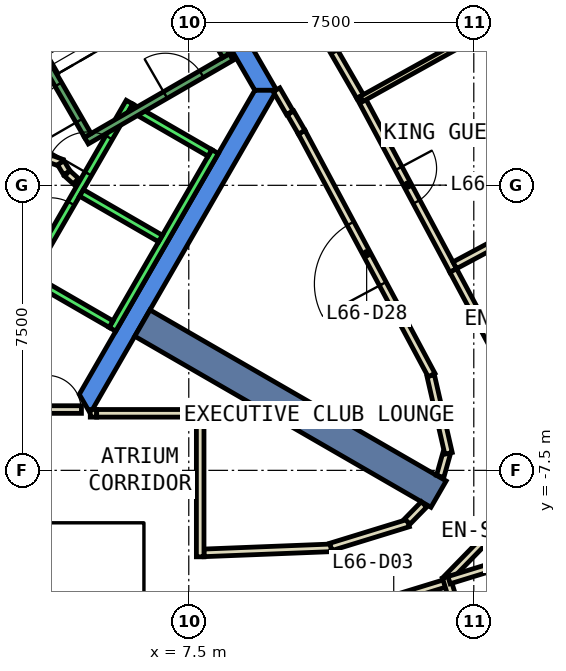
"""IFC4 building model, lengths in metres.
Left out: names, types, materials, properties, quantities, classifications, styles, units other than length and angle.
Written with IfcOpenShell. Run it as: python <this file> out.ifc"""

import sys

from ifc_helpers import new_model, si_unit, direction, frame, frame_2d, origin, place, context, subcontext, project, spatial, polyline, rectangle, outline, extrude, element, fill, save


model = new_model("IFC4")
c1 = context("Model", 3, precision=1e-05, world=origin(), true_north=direction((0.0, 1.0)))
c2 = subcontext(c1, "Body", "Model", "MODEL_VIEW")
j1 = project(units=[si_unit("LENGTHUNIT", "METRE"), si_unit("PLANEANGLEUNIT", "RADIAN")], contexts=[c1])
p1 = place(None, origin())
s1 = spatial("IfcSite", under=j1, at=p1, CompositionType="ELEMENT")
p2 = place(p1, origin())
s2 = spatial("IfcBuilding", under=s1, at=p2, CompositionType="ELEMENT")
p3 = place(p2, frame((0.0, 0.0, 286.4)))
s3 = spatial("IfcBuildingStorey", under=s2, at=p3, CompositionType="ELEMENT", Elevation=286.4)
p4 = place(p3, frame((0.0, 0.0, -0.6)))
e1 = element("IfcWall", 1, at=p4, inside=s3, PredefinedType="SHEAR", context=c2, shape_type="SweptSolid", body=[
    extrude(outline(polyline([(5.486, 9.998), (5.053, 9.748), (9.238, 2.5), (9.815, 2.5), (5.486, 9.998)])), origin(), (0.0, 0.0, 1.0), 3.86),
])
p5 = place(p3, frame((0.0, 0.0, -0.6)))
e2 = element("IfcWall", 2, at=p5, inside=s3, PredefinedType="SHEAR", context=c2, shape_type="SweptSolid", body=[
    extrude(outline(polyline([(4.907, -6.0), (9.815, 2.5), (9.238, 2.5), (4.619, -5.5), (4.907, -6.0)])), origin(), (0.0, 0.0, 1.0), 3.86),
])
p6 = place(p3, frame((6.279, -3.625, -0.6), z_axis=(0.0, 0.0, 1.0), x_axis=(0.866017533419, -0.500013631625, 0.0)))
e3 = element("IfcWall", 3, at=p6, inside=s3, PredefinedType="SHEAR", context=c2, shape_type="SweptSolid", body=[
    extrude(rectangle(XDim=9.0, YDim=0.8, at=frame_2d((4.5, 0.0))), origin(), (0.0, 0.0, 1.0), 3.86),
])
p7 = place(p3, frame((7.9, -9.671, 0.0), z_axis=(0.0, 0.0, 1.0), x_axis=(0.999223751627, 0.039394088186, 0.0)))
e4 = element("IfcWall", 4, at=p7, inside=s3, PredefinedType="PARTITIONING", context=c2, shape_type="SweptSolid", body=[
    extrude(rectangle(XDim=3.347, YDim=0.2, at=frame_2d((1.673, 0.0))), origin(), (0.0, 0.0, 1.0), 3.26),
])
p8 = place(p3, frame((11.239, -9.514, 0.0), z_axis=(0.0, 0.0, 1.0), x_axis=(0.955838469047, 0.293892533234, 0.0)))
e5 = element("IfcWall", 5, at=p8, inside=s3, PredefinedType="PARTITIONING", context=c2, shape_type="SweptSolid", body=[
    extrude(rectangle(XDim=2.13, YDim=0.2, at=frame_2d((1.065, 0.0))), origin(), (0.0, 0.0, 1.0), 3.26),
])
p9 = place(p3, frame((13.25, -8.846, 0.0), z_axis=(0.0, 0.0, 1.0), x_axis=(0.698333537371, 0.715772499181, 0.0)))
e6 = element("IfcWall", 6, at=p9, inside=s3, PredefinedType="PARTITIONING", context=c2, shape_type="SweptSolid", body=[
    extrude(rectangle(XDim=0.63, YDim=0.2, at=frame_2d((0.315, 0.0))), origin(), (0.0, 0.0, 1.0), 3.26),
])
p10 = place(p3, frame((14.115, -7.659, 0.0), z_axis=(0.0, 0.0, 1.0), x_axis=(0.270633612894, 0.96268242301, 0.0)))
e7 = element("IfcWall", 7, at=p10, inside=s3, PredefinedType="PARTITIONING", context=c2, shape_type="SweptSolid", body=[
    extrude(rectangle(XDim=0.632, YDim=0.2, at=frame_2d((0.316, 0.0))), origin(), (0.0, 0.0, 1.0), 3.26),
])
p11 = place(p3, frame((14.335, -7.052, 0.0), z_axis=(0.0, 0.0, 1.0), x_axis=(-0.22355315143, 0.974691740237, 0.0)))
e8 = element("IfcWall", 8, at=p11, inside=s3, PredefinedType="PARTITIONING", context=c2, shape_type="SweptSolid", body=[
    extrude(rectangle(XDim=2.102, YDim=0.2, at=frame_2d((1.051, 0.0))), origin(), (0.0, 0.0, 1.0), 3.26),
])
p12 = place(p3, frame((13.89, -4.994, 0.0), z_axis=(0.0, 0.0, 1.0), x_axis=(-0.471713767504, 0.881751734644, 0.0)))
e9 = element("IfcWall", 9, at=p12, inside=s3, PredefinedType="PARTITIONING", context=c2, shape_type="SweptSolid", body=[
    extrude(rectangle(XDim=7.248, YDim=0.2, at=frame_2d((3.624, 0.0))), origin(), (0.0, 0.0, 1.0), 3.26),
])
p13 = place(p12, frame((2.724, 0.0, 0.0)))
e10 = element("IfcOpeningElement", 10, at=p13, cuts=e9, PredefinedType="OPENING", context=c2, shape_type="SweptSolid", body=[
    extrude(rectangle(XDim=1.8, YDim=2.1, at=frame_2d((0.9, 1.05))), frame((0.0, 0.11, 0.0), z_axis=(0.0, -1.0, 0.0), x_axis=(1.0, 0.0, 0.0)), (0.0, 0.0, 1.0), 0.22),
])
p14 = place(p3, frame((10.471, 1.397, 0.0), z_axis=(0.0, 0.0, 1.0), x_axis=(-0.500069990121, 0.865984991198, 0.0)))
e11 = element("IfcWall", 11, at=p14, inside=s3, PredefinedType="PARTITIONING", context=c2, shape_type="SweptSolid", body=[
    extrude(rectangle(XDim=0.588, YDim=0.2, at=frame_2d((0.294, 0.0))), origin(), (0.0, 0.0, 1.0), 3.26),
])
p15 = place(p3, frame((10.157, 1.912, 0.0), z_axis=(0.0, 0.0, 1.0), x_axis=(-0.500482383858, 0.865746720148, 0.0)))
e12 = element("IfcWall", 12, at=p15, inside=s3, PredefinedType="PARTITIONING", context=c2, shape_type="SweptSolid", body=[
    extrude(rectangle(XDim=0.695, YDim=0.2, at=frame_2d((0.348, 0.0))), origin(), (0.0, 0.0, 1.0), 3.26),
])
p16 = place(p3, frame((14.243, -10.474, 0.0), z_axis=(0.0, 0.0, 1.0), x_axis=(-0.955937788993, -0.293569316475, 0.0)))
e13 = element("IfcWall", 13, at=p16, inside=s3, PredefinedType="PARTITIONING", context=c2, shape_type="SweptSolid", body=[
    extrude(rectangle(XDim=2.823, YDim=0.2, at=frame_2d((1.412, 0.0))), origin(), (0.0, 0.0, 1.0), 3.26),
])
p17 = place(p16, frame((0.912, 0.0, 0.0)))
e14 = element("IfcOpeningElement", 14, at=p17, cuts=e13, PredefinedType="OPENING", context=c2, shape_type="SweptSolid", body=[
    extrude(rectangle(XDim=1.0, YDim=2.1, at=frame_2d((0.5, 1.05))), frame((0.0, 0.11, 0.0), z_axis=(0.0, -1.0, 0.0), x_axis=(1.0, 0.0, 0.0)), (0.0, 0.0, 1.0), 0.22),
])
p18 = place(p3, frame((15.535, -9.081, 0.0), z_axis=(0.0, 0.0, 1.0), x_axis=(-0.698342132704, -0.715764113162, 0.0)))
e15 = element("IfcWall", 15, at=p18, inside=s3, PredefinedType="PARTITIONING", context=c2, shape_type="SweptSolid", body=[
    extrude(rectangle(XDim=1.836, YDim=0.2, at=frame_2d((0.918, 0.0))), origin(), (0.0, 0.0, 1.0), 3.26),
])
p19 = place(p3, frame((12.009, 2.338, 0.0), z_axis=(0.0, 0.0, 1.0), x_axis=(0.471771260231, -0.88172097515, 0.0)))
e16 = element("IfcWall", 16, at=p19, inside=s3, PredefinedType="PARTITIONING", context=c2, shape_type="SweptSolid", body=[
    extrude(rectangle(XDim=5.193, YDim=0.2, at=frame_2d((2.597, 0.0))), origin(), (0.0, 0.0, 1.0), 3.26),
])
p20 = place(p19, frame((2.146, 0.0, 0.0)))
e17 = element("IfcOpeningElement", 17, at=p20, cuts=e16, PredefinedType="OPENING", context=c2, shape_type="SweptSolid", body=[
    extrude(rectangle(XDim=1.0, YDim=2.1, at=frame_2d((0.5, 1.05))), frame((0.0, 0.11, 0.0), z_axis=(0.0, -1.0, 0.0), x_axis=(1.0, 0.0, 0.0)), (0.0, 0.0, 1.0), 0.22),
])
p21 = place(p3, frame((14.459, -2.241, 0.0), z_axis=(0.0, 0.0, 1.0), x_axis=(0.471648235011, -0.881786789656, 0.0)))
e18 = element("IfcWall", 18, at=p21, inside=s3, PredefinedType="PARTITIONING", context=c2, shape_type="SweptSolid", body=[
    extrude(rectangle(XDim=2.199, YDim=0.2, at=frame_2d((1.1, 0.0))), origin(), (0.0, 0.0, 1.0), 3.26),
])
p22 = place(p3, frame((10.17, 5.519, 0.0), z_axis=(0.0, 0.0, 1.0), x_axis=(0.499990860175, -0.866030680601, 0.0)))
e19 = element("IfcWall", 19, at=p22, inside=s3, PredefinedType="PARTITIONING", context=c2, shape_type="SweptSolid", body=[
    extrude(rectangle(XDim=3.674, YDim=0.2, at=frame_2d((1.837, 0.0))), origin(), (0.0, 0.0, 1.0), 3.26),
])
p23 = place(p22, frame((1.337, 0.0, 0.0)))
e20 = element("IfcOpeningElement", 20, at=p23, cuts=e19, PredefinedType="OPENING", context=c2, shape_type="SweptSolid", body=[
    extrude(rectangle(XDim=1.0, YDim=2.1, at=frame_2d((0.5, 1.05))), frame((0.0, 0.11, 0.0), z_axis=(0.0, -1.0, 0.0), x_axis=(1.0, 0.0, 0.0)), (0.0, 0.0, 1.0), 0.22),
])
p24 = place(p3, frame((3.838, 0.702, 0.0), z_axis=(0.0, 0.0, 1.0), x_axis=(0.941035081519, -0.338308993895, 0.0)))
e21 = element("IfcWall", 21, at=p24, inside=s3, PredefinedType="PARTITIONING", context=c2, shape_type="SweptSolid", body=[
    extrude(rectangle(XDim=0.337, YDim=0.2, at=frame_2d((0.168, 0.0))), origin(), (0.0, 0.0, 1.0), 3.26),
])
p25 = place(p3, frame((4.132, 0.593, 0.0), z_axis=(0.0, 0.0, 1.0), x_axis=(0.513561617048, -0.858052717201, 0.0)))
e22 = element("IfcWall", 22, at=p25, inside=s3, PredefinedType="PARTITIONING", context=c2, shape_type="SweptSolid", body=[
    extrude(rectangle(XDim=0.308, YDim=0.2, at=frame_2d((0.154, 0.0))), origin(), (0.0, 0.0, 1.0), 3.26),
])
p26 = place(p3, frame((4.301, 0.315, 0.0), z_axis=(0.0, 0.0, 1.0), x_axis=(0.741798017506, -0.670623367639, 0.0)))
e23 = element("IfcWall", 23, at=p26, inside=s3, PredefinedType="PARTITIONING", context=c2, shape_type="SweptSolid", body=[
    extrude(rectangle(XDim=0.309, YDim=0.2, at=frame_2d((0.154, 0.0))), origin(), (0.0, 0.0, 1.0), 3.26),
])
p27 = place(p3, frame((4.908, -5.999, 0.0), z_axis=(0.0, 0.0, 1.0), x_axis=(1.0, 0.0, 0.0)))
e24 = element("IfcWall", 24, at=p27, inside=s3, PredefinedType="PARTITIONING", context=c2, shape_type="SweptSolid", body=[
    extrude(rectangle(XDim=0.168, YDim=0.2, at=frame_2d((0.084, 0.0))), origin(), (0.0, 0.0, 1.0), 2.4),
])
p28 = place(p3, frame((7.8, -5.899, 0.0), z_axis=(0.0, 0.0, 1.0), x_axis=(0.0, -1.0, 0.0)))
e25 = element("IfcWall", 25, at=p28, inside=s3, PredefinedType="PARTITIONING", context=c2, shape_type="SweptSolid", body=[
    extrude(rectangle(XDim=3.876, YDim=0.2, at=frame_2d((1.938, 0.0))), origin(), (0.0, 0.0, 1.0), 3.26),
])
p29 = place(p3, frame((14.272, -10.308, 0.0), z_axis=(0.0, 0.0, 1.0), x_axis=(0.293868765171, -0.955845776711, 0.0)))
e26 = element("IfcWall", 26, at=p29, inside=s3, PredefinedType="PARTITIONING", context=c2, shape_type="SweptSolid", body=[
    extrude(rectangle(XDim=2.45, YDim=0.2, at=frame_2d((1.225, 0.0))), origin(), (0.0, 0.0, 1.0), 3.26),
])
p30 = place(p3, frame((16.022, -9.875, 0.0), z_axis=(0.0, 0.0, 1.0), x_axis=(-0.955908620472, -0.293664279932, 0.0)))
e27 = element("IfcWall", 27, at=p30, inside=s3, PredefinedType="PARTITIONING", context=c2, shape_type="SweptSolid", body=[
    extrude(rectangle(XDim=1.75, YDim=0.2, at=frame_2d((0.875, 0.0))), origin(), (0.0, 0.0, 1.0), 3.26),
])
p31 = place(p3, frame((16.44, -1.067, 0.0), z_axis=(0.0, 0.0, 1.0), x_axis=(-0.881700916894, -0.471808746367, 0.0)))
e28 = element("IfcWall", 28, at=p31, inside=s3, PredefinedType="PARTITIONING", context=c2, shape_type="SweptSolid", body=[
    extrude(rectangle(XDim=2.2, YDim=0.2, at=frame_2d((1.1, 0.0))), origin(), (0.0, 0.0, 1.0), 3.26),
])
p32 = place(p3, frame((12.045, 2.272, 0.0), z_axis=(0.0, 0.0, 1.0), x_axis=(0.873982340973, 0.485957680943, 0.0)))
e29 = element("IfcWall", 29, at=p32, inside=s3, PredefinedType="PARTITIONING", context=c2, shape_type="SweptSolid", body=[
    extrude(rectangle(XDim=4.28, YDim=0.15, at=frame_2d((2.14, 0.0))), origin(), (0.0, 0.0, 1.0), 3.26),
])
p33 = place(p3, frame((3.75, -5.9, 0.0), z_axis=(0.0, 0.0, 1.0), x_axis=(1.0, 0.0, 0.0)))
e30 = element("IfcWall", 30, at=p33, inside=s3, PredefinedType="PARTITIONING", context=c2, shape_type="SweptSolid", body=[
    extrude(rectangle(XDim=0.926, YDim=0.2, at=frame_2d((0.463, 0.0))), origin(), (0.0, 0.0, 1.0), 2.4),
])
p34 = place(p33, frame((0.017, 0.0, 0.0)))
e31 = element("IfcOpeningElement", 31, at=p34, cuts=e30, PredefinedType="OPENING", context=c2, shape_type="SweptSolid", body=[
    extrude(rectangle(XDim=0.9, YDim=2.1, at=frame_2d((0.45, 1.05))), frame((0.0, 0.11, 0.0), z_axis=(0.0, -1.0, 0.0), x_axis=(1.0, 0.0, 0.0)), (0.0, 0.0, 1.0), 0.22),
])
p35 = place(p3, frame((5.076, -5.999, 0.0), z_axis=(0.0, 0.0, 1.0), x_axis=(1.0, 0.0, 0.0)))
e32 = element("IfcWall", 32, at=p35, inside=s3, PredefinedType="PARTITIONING", context=c2, shape_type="SweptSolid", body=[
    extrude(rectangle(XDim=2.624, YDim=0.2, at=frame_2d((1.312, 0.0))), origin(), (0.0, 0.0, 1.0), 3.26),
])
p36 = place(p3, frame((3.24, -2.488, 0.0), z_axis=(0.0, 0.0, 1.0), x_axis=(0.500034260056, 0.866005622828, 0.0)))
e33 = element("IfcWall", 33, at=p36, inside=s3, PredefinedType="STANDARD", context=c2, shape_type="SweptSolid", body=[
    extrude(rectangle(XDim=5.399, YDim=0.2, at=frame_2d((2.7, 0.0))), origin(), (0.0, 0.0, 1.0), 3.26),
])
p37 = place(p36, frame((3.225, 0.0, 0.0)))
e34 = element("IfcOpeningElement", 34, at=p37, cuts=e33, PredefinedType="OPENING", context=c2, shape_type="SweptSolid", body=[
    extrude(rectangle(XDim=1.1, YDim=2.1, at=frame_2d((0.55, 1.05))), frame((0.0, 0.11, 0.0), z_axis=(0.0, -1.0, 0.0), x_axis=(1.0, 0.0, 0.0)), (0.0, 0.0, 1.0), 0.22),
])
p38 = place(p36, frame((1.225, 0.0, 0.0)))
e35 = element("IfcOpeningElement", 35, at=p38, cuts=e33, PredefinedType="OPENING", context=c2, shape_type="SweptSolid", body=[
    extrude(rectangle(XDim=1.1, YDim=2.1, at=frame_2d((0.55, 1.05))), frame((0.0, 0.11, 0.0), z_axis=(0.0, -1.0, 0.0), x_axis=(1.0, 0.0, 0.0)), (0.0, 0.0, 1.0), 0.22),
])
p39 = place(p3, frame((5.492, -3.788, 0.0), z_axis=(0.0, 0.0, 1.0), x_axis=(0.500034260056, 0.866005622828, 0.0)))
e36 = element("IfcWall", 36, at=p39, inside=s3, PredefinedType="STANDARD", context=c2, shape_type="SweptSolid", body=[
    extrude(rectangle(XDim=5.399, YDim=0.2, at=frame_2d((2.7, 0.0))), origin(), (0.0, 0.0, 1.0), 3.26),
])
p40 = place(p3, frame((3.377, -2.452, 0.0), z_axis=(0.0, 0.0, 1.0), x_axis=(0.865955154139, -0.50012165622, 0.0)))
e37 = element("IfcWall", 37, at=p40, inside=s3, PredefinedType="STANDARD", context=c2, shape_type="SweptSolid", body=[
    extrude(rectangle(XDim=2.4, YDim=0.2, at=frame_2d((1.2, 0.0))), origin(), (0.0, 0.0, 1.0), 3.26),
])
for number, where, z_axis, x_axis in (
    (38, (4.677, -0.2, 0.0), (0.0, 0.0, 1.0), (0.866, -0.5, 0.0)),
    (39, (5.977, 2.052, 0.0), (0.0, 0.0, 1.0), (0.866, -0.5, 0.0)),
):
    element("IfcWall", number, at=place(p3, frame(where, z_axis=z_axis, x_axis=x_axis)), inside=s3, PredefinedType="STANDARD", context=c2, shape_type="SweptSolid", body=[
        extrude(rectangle(XDim=2.399, YDim=0.2, at=frame_2d((1.2, 0.0))), origin(), (0.0, 0.0, 1.0), 3.26),
    ])
p41 = place(p3, frame((4.806, 1.176, 0.0), z_axis=(0.0, 0.0, 1.0), x_axis=(0.866059941101, 0.499940174841, 0.0)))
e40 = element("IfcWall", 40, at=p41, inside=s3, PredefinedType="STANDARD", context=c2, shape_type="SweptSolid", body=[
    extrude(rectangle(XDim=4.4, YDim=0.2, at=frame_2d((2.2, 0.0))), origin(), (0.0, 0.0, 1.0), 3.26),
])
p42 = place(p41, frame((2.4, 0.0, 0.0)))
e41 = element("IfcOpeningElement", 41, at=p42, cuts=e40, PredefinedType="OPENING", context=c2, shape_type="SweptSolid", body=[
    extrude(rectangle(XDim=1.1, YDim=2.2, at=frame_2d((0.55, 1.1))), frame((0.0, 0.11, 0.0), z_axis=(0.0, -1.0, 0.0), x_axis=(1.0, 0.0, 0.0)), (0.0, 0.0, 1.0), 0.22),
])
p43 = place(p3, frame((4.843, 1.312, 0.0), z_axis=(0.0, 0.0, 1.0), x_axis=(-0.499963383562, 0.866046543262, 0.0)))
e42 = element("IfcWall", 42, at=p43, inside=s3, PredefinedType="STANDARD", context=c2, shape_type="SweptSolid", body=[
    extrude(rectangle(XDim=6.9, YDim=0.2, at=frame_2d((3.45, 0.0))), origin(), (0.0, 0.0, 1.0), 3.26),
])
p44 = place(p43, frame((0.45, 0.0, 0.0)))
e43 = element("IfcOpeningElement", 43, at=p44, cuts=e42, PredefinedType="OPENING", context=c2, shape_type="SweptSolid", body=[
    extrude(rectangle(XDim=1.1, YDim=2.2, at=frame_2d((0.55, 1.1))), frame((0.0, 0.11, 0.0), z_axis=(0.0, -1.0, 0.0), x_axis=(1.0, 0.0, 0.0)), (0.0, 0.0, 1.0), 0.22),
])
p45 = place(p3, frame((8.48, 3.412, 0.0), z_axis=(0.0, 0.0, 1.0), x_axis=(-0.499978703459, 0.866037698999, 0.0)))
e44 = element("IfcWall", 44, at=p45, inside=s3, PredefinedType="STANDARD", context=c2, shape_type="SweptSolid", body=[
    extrude(rectangle(XDim=6.9, YDim=0.2, at=frame_2d((3.45, 0.0))), origin(), (0.0, 0.0, 1.0), 3.26),
])
p46 = place(p20, origin())
e45 = element("IfcDoor", 45, at=p46, inside=s3, OperationType="SINGLE_SWING_LEFT", PredefinedType="DOOR", context=c2, shape_type="SweptSolid", body=[
    extrude(rectangle(XDim=1.0, YDim=2.1, at=frame_2d((0.5, 1.05))), frame((0.0, 0.025, 0.0), z_axis=(0.0, -1.0, 0.0), x_axis=(1.0, 0.0, 0.0)), (0.0, 0.0, 1.0), 0.05),
])
fill(e17, e45)
p47 = place(p23, origin())
e46 = element("IfcDoor", 46, at=p47, inside=s3, OperationType="SINGLE_SWING_LEFT", PredefinedType="DOOR", context=c2, shape_type="SweptSolid", body=[
    extrude(rectangle(XDim=1.0, YDim=2.1, at=frame_2d((0.5, 1.05))), frame((0.0, 0.025, 0.0), z_axis=(0.0, -1.0, 0.0), x_axis=(1.0, 0.0, 0.0)), (0.0, 0.0, 1.0), 0.05),
])
fill(e20, e46)
p48 = place(p13, origin())
e47 = element("IfcDoor", 47, at=p48, inside=s3, OperationType="DOUBLE_DOOR_SINGLE_SWING", PredefinedType="DOOR", context=c2, shape_type="SweptSolid", body=[
    extrude(rectangle(XDim=1.8, YDim=2.1, at=frame_2d((0.9, 1.05))), frame((0.0, 0.025, 0.0), z_axis=(0.0, -1.0, 0.0), x_axis=(1.0, 0.0, 0.0)), (0.0, 0.0, 1.0), 0.05),
])
fill(e10, e47)
p49 = place(p34, origin())
e48 = element("IfcDoor", 48, at=p49, inside=s3, OperationType="SINGLE_SWING_LEFT", PredefinedType="DOOR", context=c2, shape_type="SweptSolid", body=[
    extrude(rectangle(XDim=0.9, YDim=2.1, at=frame_2d((0.45, 1.05))), frame((0.0, 0.025, 0.0), z_axis=(0.0, -1.0, 0.0), x_axis=(1.0, 0.0, 0.0)), (0.0, 0.0, 1.0), 0.05),
])
fill(e31, e48)
p50 = place(p37, origin())
e49 = element("IfcDoor", 49, at=p50, inside=s3, OperationType="SLIDING_TO_LEFT", PredefinedType="DOOR", context=c2, shape_type="SweptSolid", body=[
    extrude(rectangle(XDim=1.1, YDim=2.1, at=frame_2d((0.55, 1.05))), frame((0.0, 0.025, 0.0), z_axis=(0.0, -1.0, 0.0), x_axis=(1.0, 0.0, 0.0)), (0.0, 0.0, 1.0), 0.05),
])
fill(e34, e49)
p51 = place(p38, origin())
e50 = element("IfcDoor", 50, at=p51, inside=s3, OperationType="SLIDING_TO_LEFT", PredefinedType="DOOR", context=c2, shape_type="SweptSolid", body=[
    extrude(rectangle(XDim=1.1, YDim=2.1, at=frame_2d((0.55, 1.05))), frame((0.0, 0.025, 0.0), z_axis=(0.0, -1.0, 0.0), x_axis=(1.0, 0.0, 0.0)), (0.0, 0.0, 1.0), 0.05),
])
fill(e35, e50)
p52 = place(p44, origin())
e51 = element("IfcDoor", 51, at=p52, inside=s3, OperationType="SINGLE_SWING_LEFT", PredefinedType="DOOR", context=c2, shape_type="SweptSolid", body=[
    extrude(rectangle(XDim=1.1, YDim=2.2, at=frame_2d((0.55, 1.1))), frame((0.0, 0.025, 0.0), z_axis=(0.0, -1.0, 0.0), x_axis=(1.0, 0.0, 0.0)), (0.0, 0.0, 1.0), 0.05),
])
fill(e43, e51)
p53 = place(p42, origin())
e52 = element("IfcDoor", 52, at=p53, inside=s3, OperationType="SINGLE_SWING_LEFT", PredefinedType="DOOR", context=c2, shape_type="SweptSolid", body=[
    extrude(rectangle(XDim=1.1, YDim=2.2, at=frame_2d((0.55, 1.1))), frame((0.0, 0.025, 0.0), z_axis=(0.0, -1.0, 0.0), x_axis=(1.0, 0.0, 0.0)), (0.0, 0.0, 1.0), 0.05),
])
fill(e41, e52)
save(model, sys.argv[1])
